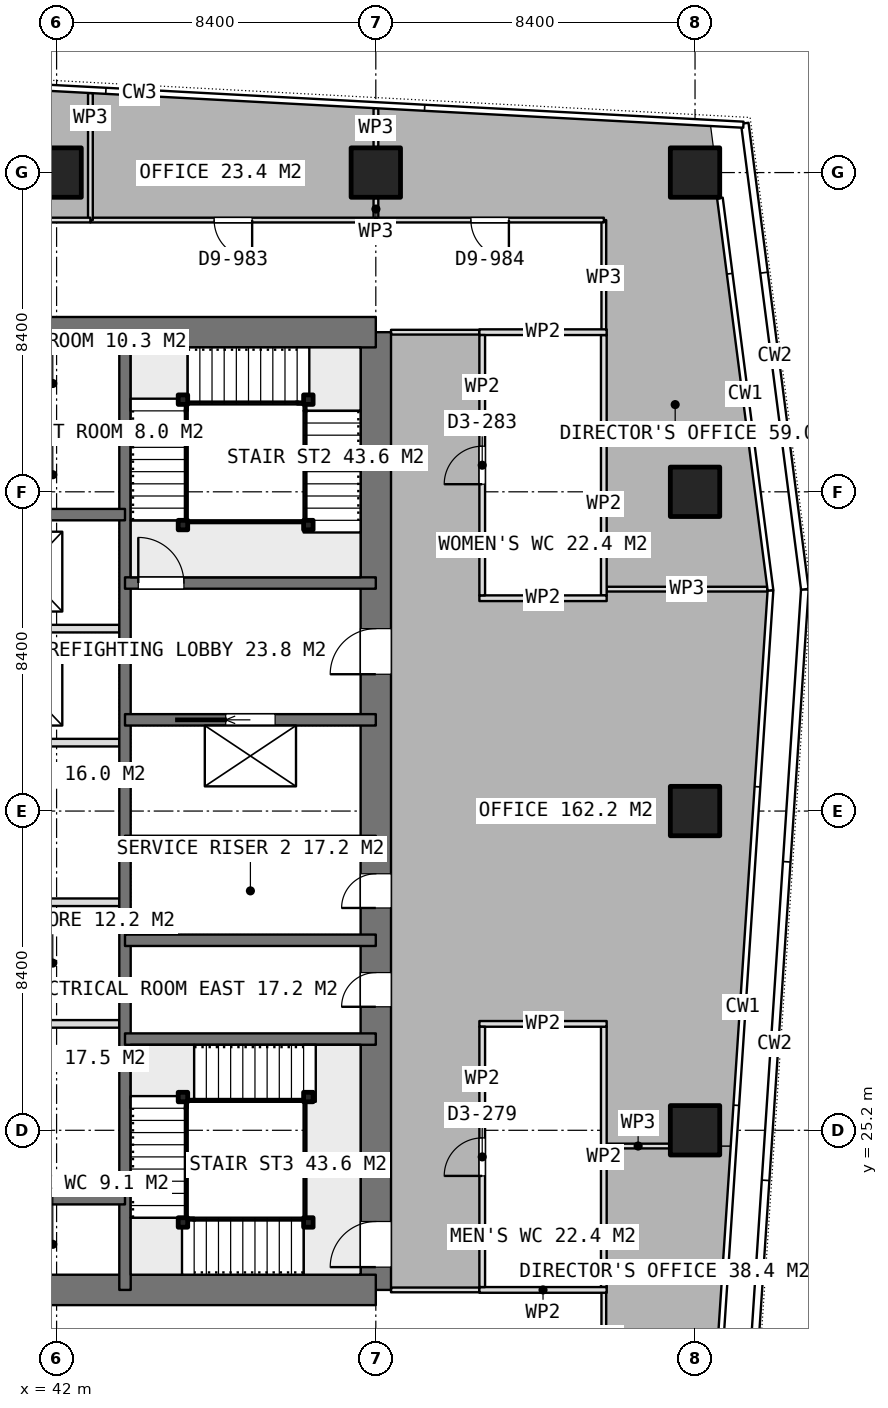
"""IFC4 building model, lengths in metres.
Left out: names, types, materials, properties, quantities, classifications, styles, units other than length and angle.
Written with IfcOpenShell. Run it as: python <this file> out.ifc"""

import sys

from ifc_helpers import new_model, si_unit, direction, frame, frame_2d, origin, origin_2d, place, context, subcontext, project, spatial, rectangle, extrude, element, fill, save


model = new_model("IFC4")
c1 = context("Model", 3, precision=1e-05, world=origin(), true_north=direction((0.0, 1.0)))
c2 = subcontext(c1, "Body", "Model", "MODEL_VIEW")
j1 = project(units=[si_unit("LENGTHUNIT", "METRE"), si_unit("PLANEANGLEUNIT", "RADIAN")], contexts=[c1])
p1 = place(None, origin())
s1 = spatial("IfcSite", under=j1, at=p1, CompositionType="ELEMENT")
p2 = place(p1, origin())
s2 = spatial("IfcBuilding", under=s1, at=p2, CompositionType="ELEMENT")
p3 = place(p2, frame((0.0, 0.0, 261.35)))
s3 = spatial("IfcBuildingStorey", under=s2, at=p3, CompositionType="ELEMENT", Elevation=261.35)
for number, where, z_axis, x_axis in (
    (1, (40.0, 21.0, 0.0), (0.0, 0.0, 1.0), (1.0, 0.0, 0.0)),
    (2, (40.0, 46.2, 0.0), (0.0, 0.0, 1.0), (1.0, 0.0, 0.0)),
):
    element("IfcWall", number, at=place(p3, frame(where, z_axis=z_axis, x_axis=x_axis)), inside=s3, PredefinedType="SHEAR", context=c2, shape_type="SweptSolid", body=[
        extrude(rectangle(XDim=10.4, YDim=0.8, at=frame_2d((5.2, 0.0))), origin(), (0.0, 0.0, 1.0), 3.75),
    ])
p4 = place(p3, frame((50.4, 21.0, 0.0), z_axis=(0.0, 0.0, 1.0), x_axis=(0.0, 1.0, 0.0)))
e3 = element("IfcWall", 3, at=p4, inside=s3, PredefinedType="SHEAR", context=c2, shape_type="SweptSolid", body=[
    extrude(rectangle(XDim=25.2, YDim=0.8, at=frame_2d((12.6, 0.0))), origin(), (0.0, 0.0, 1.0), 3.75),
])
p5 = place(p4, frame((16.2, 0.0, 0.0)))
e4 = element("IfcOpeningElement", 4, at=p5, cuts=e3, PredefinedType="OPENING", context=c2, shape_type="SweptSolid", body=[
    extrude(rectangle(XDim=1.2, YDim=2.1, at=frame_2d((0.6, 1.05))), frame((0.0, 0.41, 0.0), z_axis=(0.0, -1.0, 0.0), x_axis=(1.0, 0.0, 0.0)), (0.0, 0.0, 1.0), 0.82),
])
p6 = place(p4, frame((10.05, 0.0, 0.0)))
e5 = element("IfcOpeningElement", 5, at=p6, cuts=e3, PredefinedType="OPENING", context=c2, shape_type="SweptSolid", body=[
    extrude(rectangle(XDim=0.9, YDim=2.1, at=frame_2d((0.45, 1.05))), frame((0.0, 0.41, 0.0), z_axis=(0.0, -1.0, 0.0), x_axis=(1.0, 0.0, 0.0)), (0.0, 0.0, 1.0), 0.82),
])
p7 = place(p4, frame((7.45, 0.0, 0.0)))
e6 = element("IfcOpeningElement", 6, at=p7, cuts=e3, PredefinedType="OPENING", context=c2, shape_type="SweptSolid", body=[
    extrude(rectangle(XDim=0.9, YDim=2.1, at=frame_2d((0.45, 1.05))), frame((0.0, 0.41, 0.0), z_axis=(0.0, -1.0, 0.0), x_axis=(1.0, 0.0, 0.0)), (0.0, 0.0, 1.0), 0.82),
])
p8 = place(p4, frame((0.6, 0.0, 0.0)))
e7 = element("IfcOpeningElement", 7, at=p8, cuts=e3, PredefinedType="OPENING", context=c2, shape_type="SweptSolid", body=[
    extrude(rectangle(XDim=1.2, YDim=2.1, at=frame_2d((0.6, 1.05))), frame((0.0, 0.41, 0.0), z_axis=(0.0, -1.0, 0.0), x_axis=(1.0, 0.0, 0.0)), (0.0, 0.0, 1.0), 0.82),
])
p9 = place(p3, frame((43.8, 21.0, 0.0), z_axis=(0.0, 0.0, 1.0), x_axis=(0.0, 1.0, 0.0)))
e8 = element("IfcWall", 8, at=p9, inside=s3, PredefinedType="SHEAR", context=c2, shape_type="SweptSolid", body=[
    extrude(rectangle(XDim=25.2, YDim=0.3, at=frame_2d((12.6, 0.0))), origin(), (0.0, 0.0, 1.0), 3.75),
])
for number, where, z_axis, x_axis in (
    (9, (40.0, 23.4, 0.0), (0.0, 0.0, 1.0), (1.0, 0.0, 0.0)),
    (10, (40.0, 41.4, 0.0), (0.0, 0.0, 1.0), (1.0, 0.0, 0.0)),
):
    element("IfcWall", number, at=place(p3, frame(where, z_axis=z_axis, x_axis=x_axis)), inside=s3, PredefinedType="SHEAR", context=c2, shape_type="SweptSolid", body=[
        extrude(rectangle(XDim=3.8, YDim=0.3, at=frame_2d((1.9, 0.0))), origin(), (0.0, 0.0, 1.0), 3.75),
    ])
for number, where, z_axis, x_axis in (
    (11, (43.8, 27.6, 0.0), (0.0, 0.0, 1.0), (1.0, 0.0, 0.0)),
    (12, (43.8, 30.2, 0.0), (0.0, 0.0, 1.0), (1.0, 0.0, 0.0)),
    (13, (43.8, 32.8, 0.0), (0.0, 0.0, 1.0), (1.0, 0.0, 0.0)),
):
    element("IfcWall", number, at=place(p3, frame(where, z_axis=z_axis, x_axis=x_axis)), inside=s3, PredefinedType="SHEAR", context=c2, shape_type="SweptSolid", body=[
        extrude(rectangle(XDim=6.6, YDim=0.3, at=frame_2d((3.3, 0.0))), origin(), (0.0, 0.0, 1.0), 3.75),
    ])
p10 = place(p3, frame((43.8, 36.0, 0.0), z_axis=(0.0, 0.0, 1.0), x_axis=(1.0, 0.0, 0.0)))
e14 = element("IfcWall", 14, at=p10, inside=s3, PredefinedType="SHEAR", context=c2, shape_type="SweptSolid", body=[
    extrude(rectangle(XDim=6.6, YDim=0.3, at=frame_2d((3.3, 0.0))), origin(), (0.0, 0.0, 1.0), 3.75),
])
p11 = place(p10, frame((2.65, 0.0, 0.0)))
e15 = element("IfcOpeningElement", 15, at=p11, cuts=e14, PredefinedType="OPENING", context=c2, shape_type="SweptSolid", body=[
    extrude(rectangle(XDim=1.3, YDim=2.1, at=frame_2d((0.65, 1.05))), frame((0.0, 0.16, 0.0), z_axis=(0.0, -1.0, 0.0), x_axis=(1.0, 0.0, 0.0)), (0.0, 0.0, 1.0), 0.32),
])
p12 = place(p3, frame((43.8, 39.6, 0.0), z_axis=(0.0, 0.0, 1.0), x_axis=(1.0, 0.0, 0.0)))
e16 = element("IfcWall", 16, at=p12, inside=s3, PredefinedType="SHEAR", context=c2, shape_type="SweptSolid", body=[
    extrude(rectangle(XDim=6.6, YDim=0.3, at=frame_2d((3.3, 0.0))), origin(), (0.0, 0.0, 1.0), 3.75),
])
p13 = place(p12, frame((0.35, 0.0, 0.0)))
e17 = element("IfcOpeningElement", 17, at=p13, cuts=e16, PredefinedType="OPENING", context=c2, shape_type="SweptSolid", body=[
    extrude(rectangle(XDim=1.2, YDim=2.1, at=frame_2d((0.6, 1.05))), frame((0.0, 0.16, 0.0), z_axis=(0.0, -1.0, 0.0), x_axis=(1.0, 0.0, 0.0)), (0.0, 0.0, 1.0), 0.32),
])
for number, where, z_axis, x_axis in (
    (18, (42.0, 50.4, 0.0), (0.0, 0.0, 1.0), (1.0, 0.0, 0.0)),
    (19, (50.4, 50.4, 0.0), (0.0, 0.0, 1.0), (1.0, 0.0, 0.0)),
    (20, (58.8, 25.2, 0.0), (0.0, 0.0, 1.0), (1.0, 0.0, 0.0)),
    (21, (58.8, 33.6, 0.0), (0.0, 0.0, 1.0), (1.0, 0.0, 0.0)),
    (22, (58.8, 42.0, 0.0), (0.0, 0.0, 1.0), (1.0, 0.0, 0.0)),
    (23, (58.8, 50.4, 0.0), (0.0, 0.0, 1.0), (1.0, 0.0, 0.0)),
):
    element("IfcColumn", number, at=place(p3, frame(where, z_axis=z_axis, x_axis=x_axis)), inside=s3, PredefinedType="COLUMN", context=c2, shape_type="SweptSolid", body=[
        extrude(rectangle(XDim=1.3, YDim=1.3, at=origin_2d()), origin(), (0.0, 0.0, 1.0), 3.75),
    ])
for number, where, z_axis, x_axis in (
    (24, (40.15, 35.4, 0.0), (0.0, 0.0, 1.0), (1.0, 0.0, 0.0)),
    (25, (40.15, 38.4, 0.0), (0.0, 0.0, 1.0), (1.0, 0.0, 0.0)),
    (26, (40.15, 28.0, 0.0), (0.0, 0.0, 1.0), (1.0, 0.0, 0.0)),
    (27, (40.15, 31.2, 0.0), (0.0, 0.0, 1.0), (1.0, 0.0, 0.0)),
):
    element("IfcWall", number, at=place(p3, frame(where, z_axis=z_axis, x_axis=x_axis)), inside=s3, PredefinedType="PARTITIONING", context=c2, shape_type="SweptSolid", body=[
        extrude(rectangle(XDim=3.5, YDim=0.2, at=frame_2d((1.75, 0.0))), origin(), (0.0, 0.0, 1.0), 3.5),
    ])
p14 = place(p3, frame((40.0, 43.5, 0.0), z_axis=(0.0, 0.0, 1.0), x_axis=(1.0, 0.0, 0.0)))
e28 = element("IfcWall", 28, at=p14, inside=s3, PredefinedType="PARTITIONING", context=c2, shape_type="SweptSolid", body=[
    extrude(rectangle(XDim=3.65, YDim=0.2, at=frame_2d((1.825, 0.0))), origin(), (0.0, 0.0, 1.0), 3.5),
])
for number, where, z_axis, x_axis in (
    (29, (53.125, 39.2, 0.0), (0.0, 0.0, 1.0), (1.0, 0.0, 0.0)),
    (30, (53.125, 46.2, 0.0), (0.0, 0.0, 1.0), (1.0, 0.0, 0.0)),
):
    element("IfcWall", number, at=place(p3, frame(where, z_axis=z_axis, x_axis=x_axis)), inside=s3, PredefinedType="PARTITIONING", context=c2, shape_type="SweptSolid", body=[
        extrude(rectangle(XDim=3.35, YDim=0.15, at=frame_2d((1.675, 0.0))), origin(), (0.0, 0.0, 1.0), 3.5),
    ])
p15 = place(p3, frame((53.2, 39.275, 0.0), z_axis=(0.0, 0.0, 1.0), x_axis=(0.0, 1.0, 0.0)))
e31 = element("IfcWall", 31, at=p15, inside=s3, PredefinedType="PARTITIONING", context=c2, shape_type="SweptSolid", body=[
    extrude(rectangle(XDim=6.85, YDim=0.15, at=frame_2d((3.425, 0.0))), origin(), (0.0, 0.0, 1.0), 3.5),
])
p16 = place(p15, frame((2.925, 0.0, 0.0)))
e32 = element("IfcOpeningElement", 32, at=p16, cuts=e31, PredefinedType="OPENING", context=c2, shape_type="SweptSolid", body=[
    extrude(rectangle(XDim=1.0, YDim=2.1, at=frame_2d((0.5, 1.05))), frame((0.0, 0.085, 0.0), z_axis=(0.0, -1.0, 0.0), x_axis=(1.0, 0.0, 0.0)), (0.0, 0.0, 1.0), 0.17),
])
p17 = place(p3, frame((56.4, 39.275, 0.0), z_axis=(0.0, 0.0, 1.0), x_axis=(0.0, 1.0, 0.0)))
e33 = element("IfcWall", 33, at=p17, inside=s3, PredefinedType="PARTITIONING", context=c2, shape_type="SweptSolid", body=[
    extrude(rectangle(XDim=6.85, YDim=0.15, at=frame_2d((3.425, 0.0))), origin(), (0.0, 0.0, 1.0), 3.5),
])
for number, where, z_axis, x_axis in (
    (34, (53.125, 21.0, 0.0), (0.0, 0.0, 1.0), (1.0, 0.0, 0.0)),
    (35, (53.125, 28.0, 0.0), (0.0, 0.0, 1.0), (1.0, 0.0, 0.0)),
):
    element("IfcWall", number, at=place(p3, frame(where, z_axis=z_axis, x_axis=x_axis)), inside=s3, PredefinedType="PARTITIONING", context=c2, shape_type="SweptSolid", body=[
        extrude(rectangle(XDim=3.35, YDim=0.15, at=frame_2d((1.675, 0.0))), origin(), (0.0, 0.0, 1.0), 3.5),
    ])
p18 = place(p3, frame((53.2, 21.075, 0.0), z_axis=(0.0, 0.0, 1.0), x_axis=(0.0, 1.0, 0.0)))
e36 = element("IfcWall", 36, at=p18, inside=s3, PredefinedType="PARTITIONING", context=c2, shape_type="SweptSolid", body=[
    extrude(rectangle(XDim=6.85, YDim=0.15, at=frame_2d((3.425, 0.0))), origin(), (0.0, 0.0, 1.0), 3.5),
])
p19 = place(p18, frame((2.925, 0.0, 0.0)))
e37 = element("IfcOpeningElement", 37, at=p19, cuts=e36, PredefinedType="OPENING", context=c2, shape_type="SweptSolid", body=[
    extrude(rectangle(XDim=1.0, YDim=2.1, at=frame_2d((0.5, 1.05))), frame((0.0, 0.085, 0.0), z_axis=(0.0, -1.0, 0.0), x_axis=(1.0, 0.0, 0.0)), (0.0, 0.0, 1.0), 0.17),
])
p20 = place(p3, frame((56.4, 21.075, 0.0), z_axis=(0.0, 0.0, 1.0), x_axis=(0.0, 1.0, 0.0)))
e38 = element("IfcWall", 38, at=p20, inside=s3, PredefinedType="PARTITIONING", context=c2, shape_type="SweptSolid", body=[
    extrude(rectangle(XDim=6.85, YDim=0.15, at=frame_2d((3.425, 0.0))), origin(), (0.0, 0.0, 1.0), 3.5),
])
p21 = place(p3, frame((56.475, 24.786, 0.0), z_axis=(0.0, 0.0, 1.0), x_axis=(1.0, 0.0, 0.0)))
e39 = element("IfcWall", 39, at=p21, inside=s3, PredefinedType="PARTITIONING", context=c2, shape_type="SweptSolid", body=[
    extrude(rectangle(XDim=1.655, YDim=0.125, at=frame_2d((0.827, 0.0))), origin(), (0.0, 0.0, 1.0), 3.5),
])
p22 = place(p3, frame((56.4, 18.4, 0.0), z_axis=(0.0, 0.0, 1.0), x_axis=(0.0, 1.0, 0.0)))
e40 = element("IfcWall", 40, at=p22, inside=s3, PredefinedType="PARTITIONING", context=c2, shape_type="SweptSolid", body=[
    extrude(rectangle(XDim=2.675, YDim=0.125, at=frame_2d((1.337, 0.0))), origin(), (0.0, 0.0, 1.0), 3.5),
])
for number, where, z_axis, x_axis in (
    (41, (53.124, 21.0, 0.0), (0.0, 0.0, 1.0), (-1.0, 0.0, 0.0)),
    (42, (50.8, 46.2, 0.0), (0.0, 0.0, 1.0), (1.0, 0.0, 0.0)),
):
    element("IfcWall", number, at=place(p3, frame(where, z_axis=z_axis, x_axis=x_axis)), inside=s3, PredefinedType="PARTITIONING", context=c2, shape_type="SweptSolid", body=[
        extrude(rectangle(XDim=2.324, YDim=0.125, at=frame_2d((1.162, 0.0))), origin(), (0.0, 0.0, 1.0), 3.5),
    ])
p23 = place(p3, frame((56.475, 39.439, 0.0), z_axis=(0.0, 0.0, 1.0), x_axis=(1.0, 0.0, 0.0)))
e43 = element("IfcWall", 43, at=p23, inside=s3, PredefinedType="PARTITIONING", context=c2, shape_type="SweptSolid", body=[
    extrude(rectangle(XDim=4.225, YDim=0.125, at=frame_2d((2.112, 0.0))), origin(), (0.0, 0.0, 1.0), 3.5),
])
p24 = place(p3, frame((50.403, 49.15, 0.0), z_axis=(0.0, 0.0, 1.0), x_axis=(0.0, 1.0, 0.0)))
e44 = element("IfcWall", 44, at=p24, inside=s3, PredefinedType="PARTITIONING", context=c2, shape_type="SweptSolid", body=[
    extrude(rectangle(XDim=0.58, YDim=0.125, at=frame_2d((0.29, 0.0))), origin(), (0.0, 0.0, 1.0), 3.5),
])
p25 = place(p3, frame((50.403, 51.07, 0.0), z_axis=(0.0, 0.0, 1.0), x_axis=(0.0, 1.0, 0.0)))
e45 = element("IfcWall", 45, at=p25, inside=s3, PredefinedType="PARTITIONING", context=c2, shape_type="SweptSolid", body=[
    extrude(rectangle(XDim=1.024, YDim=0.125, at=frame_2d((0.512, 0.0))), origin(), (0.0, 0.0, 1.0), 3.5),
])
p26 = place(p3, frame((56.4, 46.125, 0.0), z_axis=(0.0, 0.0, 1.0), x_axis=(0.0, 1.0, 0.0)))
e46 = element("IfcWall", 46, at=p26, inside=s3, PredefinedType="PARTITIONING", context=c2, shape_type="SweptSolid", body=[
    extrude(rectangle(XDim=3.025, YDim=0.125, at=frame_2d((1.512, 0.0))), origin(), (0.0, 0.0, 1.0), 3.5),
])
p27 = place(p3, frame((56.4, 49.15, 0.0), z_axis=(0.0, 0.0, 1.0), x_axis=(-1.0, 0.0, 0.0)))
e47 = element("IfcWall", 47, at=p27, inside=s3, PredefinedType="PARTITIONING", context=c2, shape_type="SweptSolid", body=[
    extrude(rectangle(XDim=5.997, YDim=0.125, at=frame_2d((2.999, 0.0))), origin(), (0.0, 0.0, 1.0), 3.5),
])
p28 = place(p27, frame((2.498, 0.0, 0.0)))
e48 = element("IfcOpeningElement", 48, at=p28, cuts=e47, PredefinedType="OPENING", context=c2, shape_type="SweptSolid", body=[
    extrude(rectangle(XDim=1.0, YDim=2.1, at=frame_2d((0.5, 1.05))), frame((0.0, 0.073, 0.0), z_axis=(0.0, -1.0, 0.0), x_axis=(1.0, 0.0, 0.0)), (0.0, 0.0, 1.0), 0.145),
])
p29 = place(p3, frame((50.402, 49.15, 0.0), z_axis=(0.0, 0.0, 1.0), x_axis=(-1.0, 0.0, 0.0)))
e49 = element("IfcWall", 49, at=p29, inside=s3, PredefinedType="PARTITIONING", context=c2, shape_type="SweptSolid", body=[
    extrude(rectangle(XDim=7.512, YDim=0.125, at=frame_2d((3.756, 0.0))), origin(), (0.0, 0.0, 1.0), 3.5),
])
p30 = place(p29, frame((3.256, 0.0, 0.0)))
e50 = element("IfcOpeningElement", 50, at=p30, cuts=e49, PredefinedType="OPENING", context=c2, shape_type="SweptSolid", body=[
    extrude(rectangle(XDim=1.0, YDim=2.1, at=frame_2d((0.5, 1.05))), frame((0.0, 0.073, 0.0), z_axis=(0.0, -1.0, 0.0), x_axis=(1.0, 0.0, 0.0)), (0.0, 0.0, 1.0), 0.145),
])
p31 = place(p3, frame((42.89, 49.15, 0.0), z_axis=(0.0, 0.0, 1.0), x_axis=(0.0, 1.0, 0.0)))
e51 = element("IfcWall", 51, at=p31, inside=s3, PredefinedType="PARTITIONING", context=c2, shape_type="SweptSolid", body=[
    extrude(rectangle(XDim=3.343, YDim=0.125, at=frame_2d((1.671, 0.0))), origin(), (0.0, 0.0, 1.0), 3.5),
])
p32 = place(p3, frame((42.889, 49.15, 0.0), z_axis=(0.0, 0.0, 1.0), x_axis=(-1.0, 0.0, 0.0)))
e52 = element("IfcWall", 52, at=p32, inside=s3, PredefinedType="PARTITIONING", context=c2, shape_type="SweptSolid", body=[
    extrude(rectangle(XDim=8.471, YDim=0.125, at=frame_2d((4.235, 0.0))), origin(), (0.0, 0.0, 1.0), 3.5),
])
p33 = place(p32, frame((3.736, 0.0, 0.0)))
e53 = element("IfcOpeningElement", 53, at=p33, cuts=e52, PredefinedType="OPENING", context=c2, shape_type="SweptSolid", body=[
    extrude(rectangle(XDim=1.0, YDim=2.1, at=frame_2d((0.5, 1.05))), frame((0.0, 0.073, 0.0), z_axis=(0.0, -1.0, 0.0), x_axis=(1.0, 0.0, 0.0)), (0.0, 0.0, 1.0), 0.145),
])
for number, where, z_axis, x_axis in (
    (54, (45.325, 41.125, 0.0), (0.0, 0.0, 1.0), (1.0, 0.0, 0.0)),
    (55, (45.325, 44.425, 0.0), (0.0, 0.0, 1.0), (1.0, 0.0, 0.0)),
    (56, (48.625, 44.425, 0.0), (0.0, 0.0, 1.0), (1.0, 0.0, 0.0)),
    (57, (48.625, 41.125, 0.0), (0.0, 0.0, 1.0), (1.0, 0.0, 0.0)),
    (58, (48.625, 22.775, 0.0), (0.0, 0.0, 1.0), (1.0, 0.0, 0.0)),
    (59, (45.325, 22.775, 0.0), (0.0, 0.0, 1.0), (1.0, 0.0, 0.0)),
    (60, (45.325, 26.075, 0.0), (0.0, 0.0, 1.0), (1.0, 0.0, 0.0)),
    (61, (48.625, 26.075, 0.0), (0.0, 0.0, 1.0), (1.0, 0.0, 0.0)),
):
    element("IfcColumn", number, at=place(p3, frame(where, z_axis=z_axis, x_axis=x_axis)), inside=s3, PredefinedType="COLUMN", context=c2, shape_type="SweptSolid", body=[
        extrude(rectangle(XDim=0.25, YDim=0.25, at=origin_2d()), origin(), (0.0, 0.0, 1.0), 3.75),
    ])
p34 = place(p5, origin())
e62 = element("IfcDoor", 62, at=p34, inside=s3, OperationType="SINGLE_SWING_LEFT", PredefinedType="DOOR", context=c2, shape_type="SweptSolid", body=[
    extrude(rectangle(XDim=1.2, YDim=2.1, at=frame_2d((0.6, 1.05))), frame((0.0, 0.025, 0.0), z_axis=(0.0, -1.0, 0.0), x_axis=(1.0, 0.0, 0.0)), (0.0, 0.0, 1.0), 0.05),
])
fill(e4, e62)
p35 = place(p6, origin())
e63 = element("IfcDoor", 63, at=p35, inside=s3, OperationType="SINGLE_SWING_LEFT", PredefinedType="DOOR", context=c2, shape_type="SweptSolid", body=[
    extrude(rectangle(XDim=0.9, YDim=2.1, at=frame_2d((0.45, 1.05))), frame((0.0, 0.025, 0.0), z_axis=(0.0, -1.0, 0.0), x_axis=(1.0, 0.0, 0.0)), (0.0, 0.0, 1.0), 0.05),
])
fill(e5, e63)
p36 = place(p7, origin())
e64 = element("IfcDoor", 64, at=p36, inside=s3, OperationType="SINGLE_SWING_LEFT", PredefinedType="DOOR", context=c2, shape_type="SweptSolid", body=[
    extrude(rectangle(XDim=0.9, YDim=2.1, at=frame_2d((0.45, 1.05))), frame((0.0, 0.025, 0.0), z_axis=(0.0, -1.0, 0.0), x_axis=(1.0, 0.0, 0.0)), (0.0, 0.0, 1.0), 0.05),
])
fill(e6, e64)
p37 = place(p11, origin())
e65 = element("IfcDoor", 65, at=p37, inside=s3, OperationType="SLIDING_TO_LEFT", PredefinedType="USERDEFINED", context=c2, shape_type="SweptSolid", body=[
    extrude(rectangle(XDim=1.3, YDim=2.1, at=frame_2d((0.65, 1.05))), frame((0.0, 0.025, 0.0), z_axis=(0.0, -1.0, 0.0), x_axis=(1.0, 0.0, 0.0)), (0.0, 0.0, 1.0), 0.05),
])
fill(e15, e65)
p38 = place(p16, origin())
e66 = element("IfcDoor", 66, at=p38, inside=s3, OperationType="SINGLE_SWING_LEFT", PredefinedType="DOOR", context=c2, shape_type="SweptSolid", body=[
    extrude(rectangle(XDim=1.0, YDim=2.1, at=frame_2d((0.5, 1.05))), frame((0.0, 0.025, 0.0), z_axis=(0.0, -1.0, 0.0), x_axis=(1.0, 0.0, 0.0)), (0.0, 0.0, 1.0), 0.05),
])
fill(e32, e66)
p39 = place(p19, origin())
e67 = element("IfcDoor", 67, at=p39, inside=s3, OperationType="SINGLE_SWING_LEFT", PredefinedType="DOOR", context=c2, shape_type="SweptSolid", body=[
    extrude(rectangle(XDim=1.0, YDim=2.1, at=frame_2d((0.5, 1.05))), frame((0.0, 0.025, 0.0), z_axis=(0.0, -1.0, 0.0), x_axis=(1.0, 0.0, 0.0)), (0.0, 0.0, 1.0), 0.05),
])
fill(e37, e67)
p40 = place(p28, origin())
e68 = element("IfcDoor", 68, at=p40, inside=s3, OperationType="SINGLE_SWING_LEFT", PredefinedType="DOOR", context=c2, shape_type="SweptSolid", body=[
    extrude(rectangle(XDim=1.0, YDim=2.1, at=frame_2d((0.5, 1.05))), frame((0.0, 0.025, 0.0), z_axis=(0.0, -1.0, 0.0), x_axis=(1.0, 0.0, 0.0)), (0.0, 0.0, 1.0), 0.05),
])
fill(e48, e68)
p41 = place(p30, origin())
e69 = element("IfcDoor", 69, at=p41, inside=s3, OperationType="SINGLE_SWING_LEFT", PredefinedType="DOOR", context=c2, shape_type="SweptSolid", body=[
    extrude(rectangle(XDim=1.0, YDim=2.1, at=frame_2d((0.5, 1.05))), frame((0.0, 0.025, 0.0), z_axis=(0.0, -1.0, 0.0), x_axis=(1.0, 0.0, 0.0)), (0.0, 0.0, 1.0), 0.05),
])
fill(e50, e69)
p42 = place(p13, origin())
e70 = element("IfcDoor", 70, at=p42, inside=s3, OperationType="SINGLE_SWING_RIGHT", PredefinedType="DOOR", context=c2, shape_type="SweptSolid", body=[
    extrude(rectangle(XDim=1.2, YDim=2.1, at=frame_2d((0.6, 1.05))), frame((0.0, 0.025, 0.0), z_axis=(0.0, -1.0, 0.0), x_axis=(1.0, 0.0, 0.0)), (0.0, 0.0, 1.0), 0.05),
])
fill(e17, e70)
p43 = place(p8, origin())
e71 = element("IfcDoor", 71, at=p43, inside=s3, OperationType="SINGLE_SWING_RIGHT", PredefinedType="DOOR", context=c2, shape_type="SweptSolid", body=[
    extrude(rectangle(XDim=1.2, YDim=2.1, at=frame_2d((0.6, 1.05))), frame((0.0, 0.025, 0.0), z_axis=(0.0, -1.0, 0.0), x_axis=(1.0, 0.0, 0.0)), (0.0, 0.0, 1.0), 0.05),
])
fill(e7, e71)
save(model, sys.argv[1])
